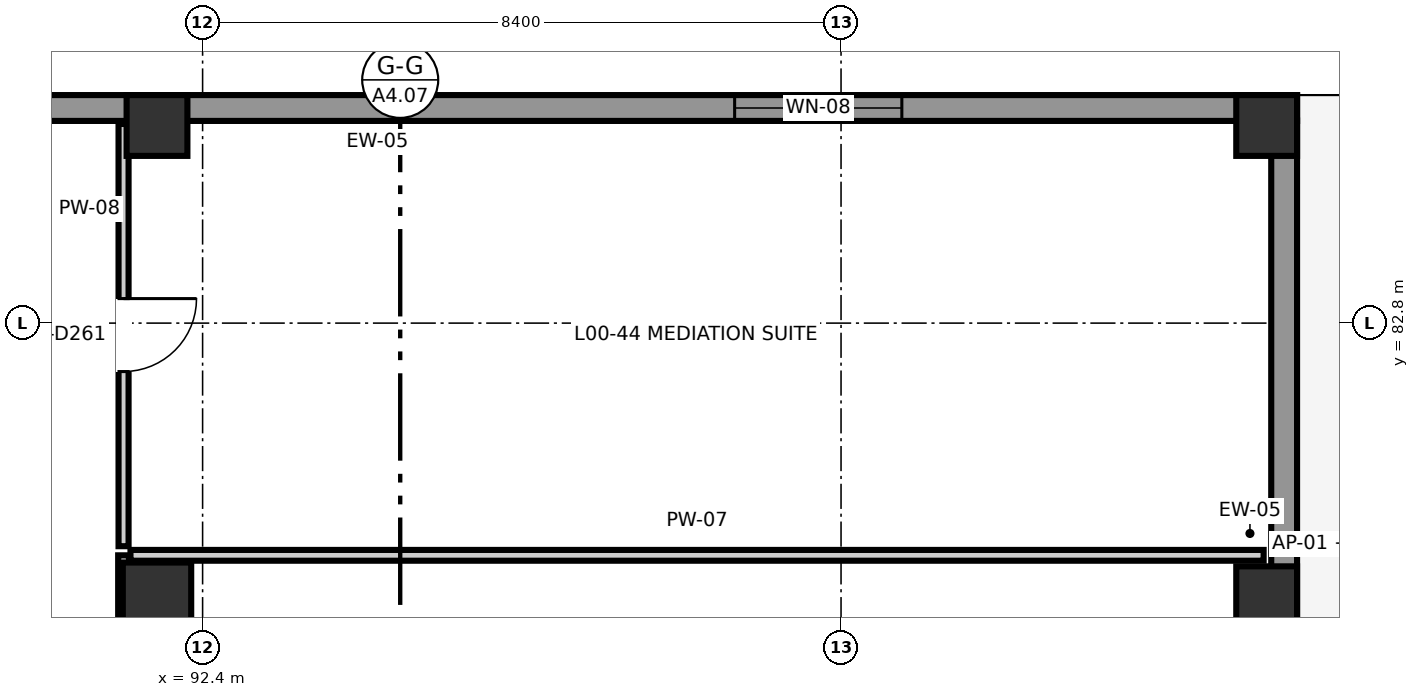
"""IFC4 building model, lengths in metres.
Left out: names, types, materials, properties, quantities, classifications, styles, units other than length and angle.
Written with IfcOpenShell. Run it as: python <this file> out.ifc"""

import sys

from ifc_helpers import new_model, si_unit, direction, frame, frame_2d, origin, origin_2d, place, context, subcontext, project, spatial, rectangle, extrude, element, fill, save


model = new_model("IFC4")
c1 = context("Model", 3, precision=1e-05, world=origin(), true_north=direction((0.0, 1.0)))
c2 = subcontext(c1, "Body", "Model", "MODEL_VIEW")
j1 = project(units=[si_unit("LENGTHUNIT", "METRE"), si_unit("PLANEANGLEUNIT", "RADIAN")], contexts=[c1])
p1 = place(None, origin())
s1 = spatial("IfcSite", under=j1, at=p1, CompositionType="ELEMENT")
p2 = place(p1, origin())
s2 = spatial("IfcBuilding", under=s1, at=p2, CompositionType="ELEMENT")
p3 = place(p2, origin())
s3 = spatial("IfcBuildingStorey", under=s2, at=p3, CompositionType="ELEMENT", Elevation=0.0)
p4 = place(p3, frame((91.8, 79.2, 0.0), z_axis=(0.0, 0.0, 1.0), x_axis=(1.0, 0.0, 0.0)))
e1 = element("IfcColumn", 1, at=p4, inside=s3, PredefinedType="COLUMN", context=c2, shape_type="SweptSolid", body=[
    extrude(rectangle(XDim=0.9, YDim=0.9, at=origin_2d()), origin(), (0.0, 0.0, 1.0), 5.4),
])
for number, where, z_axis, x_axis in (
    (2, (91.8, 85.4, 0.0), (0.0, 0.0, 1.0), (1.0, 0.0, 0.0)),
    (3, (106.4, 79.2, 0.0), (0.0, 0.0, 1.0), (1.0, 0.0, 0.0)),
    (4, (106.4, 85.4, 0.0), (0.0, 0.0, 1.0), (1.0, 0.0, 0.0)),
):
    element("IfcColumn", number, at=place(p3, frame(where, z_axis=z_axis, x_axis=x_axis)), inside=s3, PredefinedType="COLUMN", context=c2, shape_type="SweptSolid", body=[
        extrude(rectangle(XDim=0.8, YDim=0.8, at=origin_2d()), origin(), (0.0, 0.0, 1.0), 5.4),
    ])
p5 = place(p3, frame((106.63, 41.355, 0.0), z_axis=(0.0, 0.0, 1.0), x_axis=(0.0, 1.0, 0.0)))
e5 = element("IfcWall", 5, at=p5, inside=s3, PredefinedType="SOLIDWALL", context=c2, shape_type="SweptSolid", body=[
    extrude(rectangle(XDim=44.11, YDim=0.34, at=frame_2d((22.055, 0.0))), origin(), (0.0, 0.0, 1.0), 5.1),
])
p6 = place(p5, frame((25.245, 0.0, 0.0)))
e6 = element("IfcOpeningElement", 6, at=p6, cuts=e5, PredefinedType="OPENING", context=c2, shape_type="SweptSolid", body=[
    extrude(rectangle(XDim=1.2, YDim=2.2, at=frame_2d((0.6, 1.1))), frame((0.0, 0.185, 0.0), z_axis=(0.0, -1.0, 0.0), x_axis=(1.0, 0.0, 0.0)), (0.0, 0.0, 1.0), 0.37),
])
p7 = place(p5, frame((17.775, 0.0, 0.72)))
e7 = element("IfcOpeningElement", 7, at=p7, cuts=e5, PredefinedType="OPENING", context=c2, shape_type="SweptSolid", body=[
    extrude(rectangle(XDim=2.25, YDim=1.75, at=frame_2d((1.125, 0.875))), frame((0.0, 0.185, 0.0), z_axis=(0.0, -1.0, 0.0), x_axis=(1.0, 0.0, 0.0)), (0.0, 0.0, 1.0), 0.37),
])
p8 = place(p3, frame((106.8, 85.63, 0.0), z_axis=(0.0, 0.0, 1.0), x_axis=(-1.0, 0.0, 0.0)))
e8 = element("IfcWall", 8, at=p8, inside=s3, PredefinedType="SOLIDWALL", context=c2, shape_type="SweptSolid", body=[
    extrude(rectangle(XDim=22.6, YDim=0.34, at=frame_2d((11.3, 0.0))), origin(), (0.0, 0.0, 1.0), 5.1),
])
p9 = place(p8, frame((16.8, 0.0, 0.0)))
e9 = element("IfcOpeningElement", 9, at=p9, cuts=e8, PredefinedType="OPENING", context=c2, shape_type="SweptSolid", body=[
    extrude(rectangle(XDim=1.6, YDim=2.26, at=frame_2d((0.8, 1.13))), frame((0.0, 0.185, 0.0), z_axis=(0.0, -1.0, 0.0), x_axis=(1.0, 0.0, 0.0)), (0.0, 0.0, 1.0), 0.37),
])
p10 = place(p8, frame((5.2, 0.0, 0.72)))
e10 = element("IfcOpeningElement", 10, at=p10, cuts=e8, PredefinedType="OPENING", context=c2, shape_type="SweptSolid", body=[
    extrude(rectangle(XDim=2.2, YDim=1.5, at=frame_2d((1.1, 0.75))), frame((0.0, 0.185, 0.0), z_axis=(0.0, -1.0, 0.0), x_axis=(1.0, 0.0, 0.0)), (0.0, 0.0, 1.0), 0.37),
])
p11 = place(p3, frame((91.36, 73.64, 0.0), z_axis=(0.0, 0.0, 1.0), x_axis=(0.0, 1.0, 0.0)))
e11 = element("IfcWall", 11, at=p11, inside=s3, PredefinedType="PARTITIONING", context=c2, shape_type="SweptSolid", body=[
    extrude(rectangle(XDim=6.105, YDim=0.142, at=frame_2d((3.053, 0.0))), origin(), (0.0, 0.0, 1.0), 4.33),
])
p12 = place(p11, frame((2.562, 0.0, 0.0)))
e12 = element("IfcOpeningElement", 12, at=p12, cuts=e11, PredefinedType="OPENING", context=c2, shape_type="SweptSolid", body=[
    extrude(rectangle(XDim=0.98, YDim=2.09, at=frame_2d((0.49, 1.045))), frame((0.0, 0.086, 0.0), z_axis=(0.0, -1.0, 0.0), x_axis=(1.0, 0.0, 0.0)), (0.0, 0.0, 1.0), 0.172),
])
p13 = place(p3, frame((91.451, 79.745, 0.0), z_axis=(0.0, 0.0, 1.0), x_axis=(1.0, 0.0, 0.0)))
e13 = element("IfcWall", 13, at=p13, inside=s3, PredefinedType="PARTITIONING", context=c2, shape_type="SweptSolid", body=[
    extrude(rectangle(XDim=14.909, YDim=0.142, at=frame_2d((7.455, 0.0))), origin(), (0.0, 0.0, 1.0), 5.1),
])
p14 = place(p3, frame((91.36, 79.865, 0.0), z_axis=(0.0, 0.0, 1.0), x_axis=(0.0, 1.0, 0.0)))
e14 = element("IfcWall", 14, at=p14, inside=s3, PredefinedType="PARTITIONING", context=c2, shape_type="SweptSolid", body=[
    extrude(rectangle(XDim=5.555, YDim=0.132, at=frame_2d((2.777, 0.0))), origin(), (0.0, 0.0, 1.0), 5.1),
])
p15 = place(p14, frame((2.298, 0.0, 0.0)))
e15 = element("IfcOpeningElement", 15, at=p15, cuts=e14, PredefinedType="OPENING", context=c2, shape_type="SweptSolid", body=[
    extrude(rectangle(XDim=0.96, YDim=2.08, at=frame_2d((0.48, 1.04))), frame((0.0, 0.081, 0.0), z_axis=(0.0, -1.0, 0.0), x_axis=(1.0, 0.0, 0.0)), (0.0, 0.0, 1.0), 0.162),
])
p16 = place(p10, origin())
e16 = element("IfcWindow", 16, at=p16, inside=s3, PartitioningType="SINGLE_PANEL", PredefinedType="WINDOW", context=c2, shape_type="SweptSolid", body=[
    extrude(rectangle(XDim=2.2, YDim=1.5, at=frame_2d((1.1, 0.75))), frame((0.0, 0.03, 0.0), z_axis=(0.0, -1.0, 0.0), x_axis=(1.0, 0.0, 0.0)), (0.0, 0.0, 1.0), 0.06),
])
fill(e10, e16)
p17 = place(p15, origin())
e17 = element("IfcDoor", 17, at=p17, inside=s3, OperationType="SINGLE_SWING_RIGHT", PredefinedType="DOOR", context=c2, shape_type="SweptSolid", body=[
    extrude(rectangle(XDim=0.96, YDim=2.08, at=frame_2d((0.48, 1.04))), frame((0.0, 0.025, 0.0), z_axis=(0.0, -1.0, 0.0), x_axis=(1.0, 0.0, 0.0)), (0.0, 0.0, 1.0), 0.05),
])
fill(e15, e17)
save(model, sys.argv[1])
